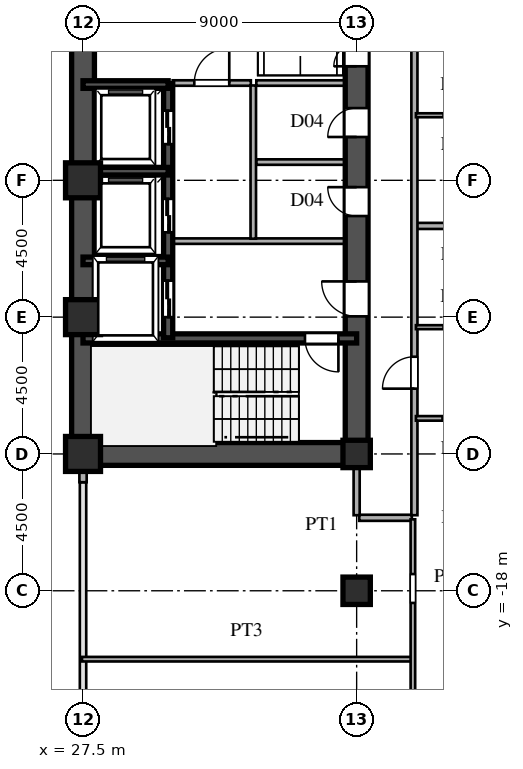
"""IFC4 building model, lengths in metres.
Left out: names, types, materials, properties, quantities, classifications, styles, units other than length and angle.
Written with IfcOpenShell. Run it as: python <this file> out.ifc"""

import sys

from ifc_helpers import new_model, si_unit, direction, frame, frame_2d, origin, origin_2d, place, context, subcontext, project, spatial, rectangle, hollow_rectangle, i_section, extrude, source, transform, mapped, element, fill, save


model = new_model("IFC4")
c1 = context("Model", 3, precision=1e-05, world=origin(), true_north=direction((0.0, 1.0)))
c2 = subcontext(c1, "Body", "Model", "MODEL_VIEW")
j1 = project(units=[si_unit("LENGTHUNIT", "METRE"), si_unit("PLANEANGLEUNIT", "RADIAN")], contexts=[c1])
p1 = place(None, origin())
s1 = spatial("IfcSite", under=j1, at=p1, CompositionType="ELEMENT")
p2 = place(p1, origin())
s2 = spatial("IfcBuilding", under=s1, at=p2, CompositionType="ELEMENT")
p3 = place(p2, frame((0.0, 0.0, 29.7)))
s3 = spatial("IfcBuildingStorey", under=s2, at=p3, CompositionType="ELEMENT", Elevation=29.7)
m1 = source(origin(), c2, "Body", "SweptSolid", [
    extrude(hollow_rectangle(XDim=1.15, YDim=1.15, WallThickness=0.048, at=origin_2d()), origin(), (0.0, 0.0, 1.0), 3.6),
])
for number, where, z_axis, x_axis in (
    (1, (27.5, -13.5, 0.0), (0.0, 0.0, 1.0), (1.0, 0.0, 0.0)),
    (2, (27.5, -9.0, 0.0), (0.0, 0.0, 1.0), (1.0, 0.0, 0.0)),
    (3, (27.5, -4.5, 0.0), (0.0, 0.0, 1.0), (1.0, 0.0, 0.0)),
):
    element("IfcColumn", number, at=place(p3, frame(where, z_axis=z_axis, x_axis=x_axis)), inside=s3, PredefinedType="COLUMN", context=c2, shape_type="MappedRepresentation", body=[
        mapped(m1, transform((0.0, 0.0, 0.0), scale=1.0)),
    ])
m2 = source(origin(), c2, "Body", "SweptSolid", [
    extrude(i_section(OverallWidth=0.9, OverallDepth=0.9, WebThickness=0.036, FlangeThickness=0.055, at=origin_2d()), origin(), (0.0, 0.0, 1.0), 3.6),
])
for number, where, z_axis, x_axis in (
    (4, (36.5, -18.0, 0.0), (0.0, 0.0, 1.0), (1.0, 0.0, 0.0)),
    (5, (36.5, -13.5, 0.0), (0.0, 0.0, 1.0), (1.0, 0.0, 0.0)),
):
    element("IfcColumn", number, at=place(p3, frame(where, z_axis=z_axis, x_axis=x_axis)), inside=s3, PredefinedType="COLUMN", context=c2, shape_type="MappedRepresentation", body=[
        mapped(m2, transform((0.0, 0.0, 0.0), scale=1.0)),
    ])
p4 = place(p3, frame((27.5, -14.43, 0.0), z_axis=(0.0, 0.0, 1.0), x_axis=(0.0, 1.0, 0.0)))
e6 = element("IfcWall", 6, at=p4, inside=s3, PredefinedType="SOLIDWALL", context=c2, shape_type="SweptSolid", body=[
    extrude(rectangle(XDim=0.55, YDim=0.24, at=frame_2d((0.275, 0.0))), origin(), (0.0, 0.0, 1.0), 2.88),
])
p5 = place(p3, frame((27.5, -13.5, 0.0), z_axis=(0.0, 0.0, 1.0), x_axis=(0.0, 1.0, 0.0)))
e7 = element("IfcWall", 7, at=p5, inside=s3, PredefinedType="SHEAR", context=c2, shape_type="SweptSolid", body=[
    extrude(rectangle(XDim=12.2, YDim=0.75, at=frame_2d((6.1, 0.0))), origin(), (0.0, 0.0, 1.0), 3.38),
])
p6 = place(p3, frame((27.5, -1.3, 0.0), z_axis=(0.0, 0.0, 1.0), x_axis=(0.0, 1.0, 0.0)))
e8 = element("IfcWall", 8, at=p6, inside=s3, PredefinedType="SHEAR", context=c2, shape_type="SweptSolid", body=[
    extrude(rectangle(XDim=2.6, YDim=0.75, at=frame_2d((1.3, 0.0))), origin(), (0.0, 0.0, 1.0), 3.38),
])
p7 = place(p3, frame((27.5, -13.5, 0.0), z_axis=(0.0, 0.0, 1.0), x_axis=(1.0, 0.0, 0.0)))
e9 = element("IfcWall", 9, at=p7, inside=s3, PredefinedType="SHEAR", context=c2, shape_type="SweptSolid", body=[
    extrude(rectangle(XDim=9.0, YDim=0.75, at=frame_2d((4.5, 0.0))), origin(), (0.0, 0.0, 1.0), 3.38),
])
p8 = place(p3, frame((36.5, -13.65, 0.0), z_axis=(0.0, 0.0, 1.0), x_axis=(0.0, 1.0, 0.0)))
e10 = element("IfcWall", 10, at=p8, inside=s3, PredefinedType="SHEAR", context=c2, shape_type="SweptSolid", body=[
    extrude(rectangle(XDim=7.15, YDim=0.75, at=frame_2d((3.575, 0.0))), origin(), (0.0, 0.0, 1.0), 3.38),
])
p9 = place(p8, frame((4.675, 0.0, 0.0)))
e11 = element("IfcOpeningElement", 11, at=p9, cuts=e10, PredefinedType="OPENING", context=c2, shape_type="SweptSolid", body=[
    extrude(rectangle(XDim=1.15, YDim=2.2, at=frame_2d((0.575, 1.1))), frame((0.0, 0.385, 0.0), z_axis=(0.0, -1.0, 0.0), x_axis=(1.0, 0.0, 0.0)), (0.0, 0.0, 1.0), 0.77),
])
p10 = place(p3, frame((36.5, -1.3, 0.0), z_axis=(0.0, 0.0, 1.0), x_axis=(0.0, 1.0, 0.0)))
e12 = element("IfcWall", 12, at=p10, inside=s3, PredefinedType="SHEAR", context=c2, shape_type="SweptSolid", body=[
    extrude(rectangle(XDim=2.6, YDim=0.75, at=frame_2d((1.3, 0.0))), origin(), (0.0, 0.0, 1.0), 3.38),
])
p11 = place(p10, frame((0.55, 0.0, 0.0)))
e13 = element("IfcOpeningElement", 13, at=p11, cuts=e12, PredefinedType="OPENING", context=c2, shape_type="SweptSolid", body=[
    extrude(rectangle(XDim=1.5, YDim=2.3, at=frame_2d((0.75, 1.15))), frame((0.0, 0.385, 0.0), z_axis=(0.0, -1.0, 0.0), x_axis=(1.0, 0.0, 0.0)), (0.0, 0.0, 1.0), 0.77),
])
p12 = place(p3, frame((36.5, -6.5, 0.0), z_axis=(0.0, 0.0, 1.0), x_axis=(0.0, 1.0, 0.0)))
e14 = element("IfcWall", 14, at=p12, inside=s3, PredefinedType="SHEAR", context=c2, shape_type="SweptSolid", body=[
    extrude(rectangle(XDim=2.6, YDim=0.75, at=frame_2d((1.3, 0.0))), origin(), (0.0, 0.0, 1.0), 3.38),
])
p13 = place(p12, frame((0.825, 0.0, 0.0)))
e15 = element("IfcOpeningElement", 15, at=p13, cuts=e14, PredefinedType="OPENING", context=c2, shape_type="SweptSolid", body=[
    extrude(rectangle(XDim=0.95, YDim=2.15, at=frame_2d((0.475, 1.075))), frame((0.0, 0.385, 0.0), z_axis=(0.0, -1.0, 0.0), x_axis=(1.0, 0.0, 0.0)), (0.0, 0.0, 1.0), 0.77),
])
p14 = place(p3, frame((36.5, -3.9, 0.0), z_axis=(0.0, 0.0, 1.0), x_axis=(0.0, 1.0, 0.0)))
e16 = element("IfcWall", 16, at=p14, inside=s3, PredefinedType="SHEAR", context=c2, shape_type="SweptSolid", body=[
    extrude(rectangle(XDim=2.6, YDim=0.75, at=frame_2d((1.3, 0.0))), origin(), (0.0, 0.0, 1.0), 3.38),
])
p15 = place(p14, frame((0.825, 0.0, 0.0)))
e17 = element("IfcOpeningElement", 17, at=p15, cuts=e16, PredefinedType="OPENING", context=c2, shape_type="SweptSolid", body=[
    extrude(rectangle(XDim=0.95, YDim=2.15, at=frame_2d((0.475, 1.075))), frame((0.0, 0.385, 0.0), z_axis=(0.0, -1.0, 0.0), x_axis=(1.0, 0.0, 0.0)), (0.0, 0.0, 1.0), 0.77),
])
p16 = place(p3, frame((27.5, -9.7, 0.0), z_axis=(0.0, 0.0, 1.0), x_axis=(1.0, 0.0, 0.0)))
e18 = element("IfcWall", 18, at=p16, inside=s3, PredefinedType="SHEAR", context=c2, shape_type="SweptSolid", body=[
    extrude(rectangle(XDim=9.0, YDim=0.3, at=frame_2d((4.5, 0.0))), origin(), (0.0, 0.0, 1.0), 3.38),
])
p17 = place(p16, frame((7.3, 0.0, 0.0)))
e19 = element("IfcOpeningElement", 19, at=p17, cuts=e18, PredefinedType="OPENING", context=c2, shape_type="SweptSolid", body=[
    extrude(rectangle(XDim=1.1, YDim=2.2, at=frame_2d((0.55, 1.1))), frame((0.0, 0.16, 0.0), z_axis=(0.0, -1.0, 0.0), x_axis=(1.0, 0.0, 0.0)), (0.0, 0.0, 1.0), 0.32),
])
for number, where, z_axis, x_axis in (
    (20, (27.5, -7.15, 0.0), (0.0, 0.0, 1.0), (1.0, 0.0, 0.0)),
    (21, (27.5, -4.2, 0.0), (0.0, 0.0, 1.0), (1.0, 0.0, 0.0)),
    (22, (27.5, -1.35, 0.0), (0.0, 0.0, 1.0), (1.0, 0.0, 0.0)),
):
    element("IfcWall", number, at=place(p3, frame(where, z_axis=z_axis, x_axis=x_axis)), inside=s3, PredefinedType="SHEAR", context=c2, shape_type="SweptSolid", body=[
        extrude(rectangle(XDim=2.8, YDim=0.25, at=frame_2d((1.4, 0.0))), origin(), (0.0, 0.0, 1.0), 3.38),
    ])
p18 = place(p3, frame((30.3, -9.68, 0.0), z_axis=(0.0, 0.0, 1.0), x_axis=(0.0, 1.0, 0.0)))
e23 = element("IfcWall", 23, at=p18, inside=s3, PredefinedType="SHEAR", context=c2, shape_type="SweptSolid", body=[
    extrude(rectangle(XDim=2.56, YDim=0.3, at=frame_2d((1.28, 0.0))), origin(), (0.0, 0.0, 1.0), 3.38),
])
p19 = place(p18, frame((0.68, 0.0, 0.0)))
e24 = element("IfcOpeningElement", 24, at=p19, cuts=e23, PredefinedType="OPENING", context=c2, shape_type="SweptSolid", body=[
    extrude(rectangle(XDim=1.2, YDim=2.25, at=frame_2d((0.6, 1.125))), frame((0.0, 0.16, 0.0), z_axis=(0.0, -1.0, 0.0), x_axis=(1.0, 0.0, 0.0)), (0.0, 0.0, 1.0), 0.32),
])
p20 = place(p3, frame((30.3, -7.12, 0.0), z_axis=(0.0, 0.0, 1.0), x_axis=(0.0, 1.0, 0.0)))
e25 = element("IfcWall", 25, at=p20, inside=s3, PredefinedType="SHEAR", context=c2, shape_type="SweptSolid", body=[
    extrude(rectangle(XDim=2.92, YDim=0.3, at=frame_2d((1.46, 0.0))), origin(), (0.0, 0.0, 1.0), 3.38),
])
p21 = place(p20, frame((0.91, 0.0, 0.0)))
e26 = element("IfcOpeningElement", 26, at=p21, cuts=e25, PredefinedType="OPENING", context=c2, shape_type="SweptSolid", body=[
    extrude(rectangle(XDim=1.1, YDim=2.2, at=frame_2d((0.55, 1.1))), frame((0.0, 0.16, 0.0), z_axis=(0.0, -1.0, 0.0), x_axis=(1.0, 0.0, 0.0)), (0.0, 0.0, 1.0), 0.32),
])
p22 = place(p3, frame((30.3, -4.2, 0.0), z_axis=(0.0, 0.0, 1.0), x_axis=(0.0, 1.0, 0.0)))
e27 = element("IfcWall", 27, at=p22, inside=s3, PredefinedType="SHEAR", context=c2, shape_type="SweptSolid", body=[
    extrude(rectangle(XDim=2.88, YDim=0.3, at=frame_2d((1.44, 0.0))), origin(), (0.0, 0.0, 1.0), 3.38),
])
p23 = place(p22, frame((0.89, 0.0, 0.0)))
e28 = element("IfcOpeningElement", 28, at=p23, cuts=e27, PredefinedType="OPENING", context=c2, shape_type="SweptSolid", body=[
    extrude(rectangle(XDim=1.1, YDim=2.2, at=frame_2d((0.55, 1.1))), frame((0.0, 0.16, 0.0), z_axis=(0.0, -1.0, 0.0), x_axis=(1.0, 0.0, 0.0)), (0.0, 0.0, 1.0), 0.32),
])
p24 = place(p3, frame((30.45, -6.5, 0.0), z_axis=(0.0, 0.0, 1.0), x_axis=(1.0, 0.0, 0.0)))
e29 = element("IfcWall", 29, at=p24, inside=s3, PredefinedType="PARTITIONING", context=c2, shape_type="SweptSolid", body=[
    extrude(rectangle(XDim=5.7, YDim=0.18, at=frame_2d((2.85, 0.0))), origin(), (0.0, 0.0, 1.0), 3.38),
])
p25 = place(p3, frame((33.1, -6.42, 0.0), z_axis=(0.0, 0.0, 1.0), x_axis=(0.0, 1.0, 0.0)))
e30 = element("IfcWall", 30, at=p25, inside=s3, PredefinedType="PARTITIONING", context=c2, shape_type="SweptSolid", body=[
    extrude(rectangle(XDim=5.04, YDim=0.18, at=frame_2d((2.52, 0.0))), origin(), (0.0, 0.0, 1.0), 3.38),
])
p26 = place(p3, frame((30.45, -1.3, 0.0), z_axis=(0.0, 0.0, 1.0), x_axis=(1.0, 0.0, 0.0)))
e31 = element("IfcWall", 31, at=p26, inside=s3, PredefinedType="PARTITIONING", context=c2, shape_type="SweptSolid", body=[
    extrude(rectangle(XDim=2.57, YDim=0.18, at=frame_2d((1.285, 0.0))), origin(), (0.0, 0.0, 1.0), 3.38),
])
p27 = place(p26, frame((0.71, 0.0, 0.0)))
e32 = element("IfcOpeningElement", 32, at=p27, cuts=e31, PredefinedType="OPENING", context=c2, shape_type="SweptSolid", body=[
    extrude(rectangle(XDim=1.15, YDim=2.2, at=frame_2d((0.575, 1.1))), frame((0.0, 0.1, 0.0), z_axis=(0.0, -1.0, 0.0), x_axis=(1.0, 0.0, 0.0)), (0.0, 0.0, 1.0), 0.2),
])
for number, where, z_axis, x_axis in (
    (33, (33.2, -1.3, 0.0), (0.0, 0.0, 1.0), (1.0, 0.0, 0.0)),
    (34, (33.2, -3.9, 0.0), (0.0, 0.0, 1.0), (1.0, 0.0, 0.0)),
):
    element("IfcWall", number, at=place(p3, frame(where, z_axis=z_axis, x_axis=x_axis)), inside=s3, PredefinedType="PARTITIONING", context=c2, shape_type="SweptSolid", body=[
        extrude(rectangle(XDim=2.95, YDim=0.18, at=frame_2d((1.475, 0.0))), origin(), (0.0, 0.0, 1.0), 3.38),
    ])
p28 = place(p3, frame((27.465, -20.25, 0.0), z_axis=(0.0, 0.0, 1.0), x_axis=(1.0, 0.0, 0.0)))
e35 = element("IfcWall", 35, at=p28, inside=s3, PredefinedType="PARTITIONING", context=c2, shape_type="SweptSolid", body=[
    extrude(rectangle(XDim=10.835, YDim=0.15, at=frame_2d((5.417, 0.0))), origin(), (0.0, 0.0, 1.0), 3.38),
])
p29 = place(p3, frame((36.585, -15.6, 0.0), z_axis=(0.0, 0.0, 1.0), x_axis=(1.0, 0.0, 0.0)))
e36 = element("IfcWall", 36, at=p29, inside=s3, PredefinedType="PARTITIONING", context=c2, shape_type="SweptSolid", body=[
    extrude(rectangle(XDim=1.73, YDim=0.2, at=frame_2d((0.865, 0.0))), origin(), (0.0, 0.0, 1.0), 3.38),
])
p30 = place(p3, frame((38.45, -12.33, 0.0), z_axis=(0.0, 0.0, 1.0), x_axis=(1.0, 0.0, 0.0)))
e37 = element("IfcWall", 37, at=p30, inside=s3, PredefinedType="PARTITIONING", context=c2, shape_type="SweptSolid", body=[
    extrude(rectangle(XDim=2.7, YDim=0.15, at=frame_2d((1.35, 0.0))), origin(), (0.0, 0.0, 1.0), 3.38),
])
p31 = place(p30, frame((0.875, 0.0, 0.0)))
e38 = element("IfcOpeningElement", 38, at=p31, cuts=e37, PredefinedType="OPENING", context=c2, shape_type="SweptSolid", body=[
    extrude(rectangle(XDim=0.95, YDim=2.15, at=frame_2d((0.475, 1.075))), frame((0.0, 0.085, 0.0), z_axis=(0.0, -1.0, 0.0), x_axis=(1.0, 0.0, 0.0)), (0.0, 0.0, 1.0), 0.17),
])
p32 = place(p3, frame((38.45, -9.33, 0.0), z_axis=(0.0, 0.0, 1.0), x_axis=(1.0, 0.0, 0.0)))
e39 = element("IfcWall", 39, at=p32, inside=s3, PredefinedType="PARTITIONING", context=c2, shape_type="SweptSolid", body=[
    extrude(rectangle(XDim=2.7, YDim=0.13, at=frame_2d((1.35, 0.0))), origin(), (0.0, 0.0, 1.0), 3.38),
])
p33 = place(p32, frame((0.91, 0.0, 0.0)))
e40 = element("IfcOpeningElement", 40, at=p33, cuts=e39, PredefinedType="OPENING", context=c2, shape_type="SweptSolid", body=[
    extrude(rectangle(XDim=0.88, YDim=2.1, at=frame_2d((0.44, 1.05))), frame((0.0, 0.075, 0.0), z_axis=(0.0, -1.0, 0.0), x_axis=(1.0, 0.0, 0.0)), (0.0, 0.0, 1.0), 0.15),
])
p34 = place(p3, frame((38.48, -6.0, 0.0), z_axis=(0.0, 0.0, 1.0), x_axis=(1.0, 0.0, 0.0)))
e41 = element("IfcWall", 41, at=p34, inside=s3, PredefinedType="PARTITIONING", context=c2, shape_type="SweptSolid", body=[
    extrude(rectangle(XDim=34.025, YDim=0.2, at=frame_2d((17.012, 0.0))), origin(), (0.0, 0.0, 1.0), 3.38),
])
p35 = place(p3, frame((38.45, -2.36, 0.0), z_axis=(0.0, 0.0, 1.0), x_axis=(1.0, 0.0, 0.0)))
e42 = element("IfcWall", 42, at=p35, inside=s3, PredefinedType="PARTITIONING", context=c2, shape_type="SweptSolid", body=[
    extrude(rectangle(XDim=2.7, YDim=0.13, at=frame_2d((1.35, 0.0))), origin(), (0.0, 0.0, 1.0), 3.38),
])
p36 = place(p35, frame((0.91, 0.0, 0.0)))
e43 = element("IfcOpeningElement", 43, at=p36, cuts=e42, PredefinedType="OPENING", context=c2, shape_type="SweptSolid", body=[
    extrude(rectangle(XDim=0.88, YDim=2.1, at=frame_2d((0.44, 1.05))), frame((0.0, 0.075, 0.0), z_axis=(0.0, -1.0, 0.0), x_axis=(1.0, 0.0, 0.0)), (0.0, 0.0, 1.0), 0.15),
])
p37 = place(p3, frame((36.5, -15.515, 0.0), z_axis=(0.0, 0.0, 1.0), x_axis=(0.0, 1.0, 0.0)))
e44 = element("IfcWall", 44, at=p37, inside=s3, PredefinedType="PARTITIONING", context=c2, shape_type="SweptSolid", body=[
    extrude(rectangle(XDim=1.635, YDim=0.2, at=frame_2d((0.817, 0.0))), origin(), (0.0, 0.0, 1.0), 2.68),
])
p38 = place(p3, frame((38.35, -23.858, 0.0), z_axis=(0.0, 0.0, 1.0), x_axis=(0.0, 1.0, 0.0)))
e45 = element("IfcWall", 45, at=p38, inside=s3, PredefinedType="PARTITIONING", context=c2, shape_type="SweptSolid", body=[
    extrude(rectangle(XDim=8.208, YDim=0.15, at=frame_2d((4.104, 0.0))), origin(), (0.0, 0.0, 1.0), 3.38),
])
p39 = place(p38, frame((1.347, 0.0, 0.0)))
e46 = element("IfcOpeningElement", 46, at=p39, cuts=e45, PredefinedType="OPENING", context=c2, shape_type="SweptSolid", body=[
    extrude(rectangle(XDim=0.95, YDim=2.15, at=frame_2d((0.475, 1.075))), frame((0.0, 0.085, 0.0), z_axis=(0.0, -1.0, 0.0), x_axis=(1.0, 0.0, 0.0)), (0.0, 0.0, 1.0), 0.17),
])
p40 = place(p38, frame((5.458, 0.0, 0.0)))
e47 = element("IfcOpeningElement", 47, at=p40, cuts=e45, PredefinedType="OPENING", context=c2, shape_type="SweptSolid", body=[
    extrude(rectangle(XDim=0.95, YDim=2.15, at=frame_2d((0.475, 1.075))), frame((0.0, 0.085, 0.0), z_axis=(0.0, -1.0, 0.0), x_axis=(1.0, 0.0, 0.0)), (0.0, 0.0, 1.0), 0.17),
])
p41 = place(p3, frame((38.4, -15.515, 0.0), z_axis=(0.0, 0.0, 1.0), x_axis=(0.0, 1.0, 0.0)))
e48 = element("IfcWall", 48, at=p41, inside=s3, PredefinedType="PARTITIONING", context=c2, shape_type="SweptSolid", body=[
    extrude(rectangle(XDim=31.03, YDim=0.2, at=frame_2d((15.515, 0.0))), origin(), (0.0, 0.0, 1.0), 3.38),
])
p42 = place(p41, frame((4.163, 0.0, 0.0)))
e49 = element("IfcOpeningElement", 49, at=p42, cuts=e48, PredefinedType="OPENING", context=c2, shape_type="SweptSolid", body=[
    extrude(rectangle(XDim=1.05, YDim=2.25, at=frame_2d((0.525, 1.125))), frame((0.0, 0.11, 0.0), z_axis=(0.0, -1.0, 0.0), x_axis=(1.0, 0.0, 0.0)), (0.0, 0.0, 1.0), 0.22),
])
p43 = place(p41, frame((15.538, 0.0, 0.0)))
e50 = element("IfcOpeningElement", 50, at=p43, cuts=e48, PredefinedType="OPENING", context=c2, shape_type="SweptSolid", body=[
    extrude(rectangle(XDim=1.05, YDim=2.25, at=frame_2d((0.525, 1.125))), frame((0.0, 0.11, 0.0), z_axis=(0.0, -1.0, 0.0), x_axis=(1.0, 0.0, 0.0)), (0.0, 0.0, 1.0), 0.22),
])
p44 = place(p41, frame((26.635, 0.0, 0.0)))
e51 = element("IfcOpeningElement", 51, at=p44, cuts=e48, PredefinedType="OPENING", context=c2, shape_type="SweptSolid", body=[
    extrude(rectangle(XDim=1.05, YDim=2.25, at=frame_2d((0.525, 1.125))), frame((0.0, 0.11, 0.0), z_axis=(0.0, -1.0, 0.0), x_axis=(1.0, 0.0, 0.0)), (0.0, 0.0, 1.0), 0.22),
])
m3 = source(origin(), c2, "Body", "SweptSolid", [
    extrude(rectangle(XDim=1.15, YDim=2.2, at=frame_2d((0.575, 1.1))), frame((0.0, 0.025, 0.0), z_axis=(0.0, -1.0, 0.0), x_axis=(1.0, 0.0, 0.0)), (0.0, 0.0, 1.0), 0.05),
])
p45 = place(p9, origin())
e52 = element("IfcDoor", 52, at=p45, inside=s3, OperationType="SINGLE_SWING_RIGHT", PredefinedType="DOOR", context=c2, shape_type="MappedRepresentation", body=[
    mapped(m3, transform((0.0, 0.0, 0.0), scale=1.0)),
])
fill(e11, e52)
m4 = source(origin(), c2, "Body", "SweptSolid", [
    extrude(rectangle(XDim=1.5, YDim=2.3, at=frame_2d((0.75, 1.15))), frame((0.0, 0.025, 0.0), z_axis=(0.0, -1.0, 0.0), x_axis=(1.0, 0.0, 0.0)), (0.0, 0.0, 1.0), 0.05),
])
p46 = place(p11, origin())
e53 = element("IfcDoor", 53, at=p46, inside=s3, OperationType="DOUBLE_SWING_LEFT", PredefinedType="DOOR", context=c2, shape_type="MappedRepresentation", body=[
    mapped(m4, transform((0.0, 0.0, 0.0), scale=1.0)),
])
fill(e13, e53)
m5 = source(origin(), c2, "Body", "SweptSolid", [
    extrude(rectangle(XDim=0.95, YDim=2.15, at=frame_2d((0.475, 1.075))), frame((0.0, 0.025, 0.0), z_axis=(0.0, -1.0, 0.0), x_axis=(1.0, 0.0, 0.0)), (0.0, 0.0, 1.0), 0.05),
])
p47 = place(p13, origin())
e54 = element("IfcDoor", 54, at=p47, inside=s3, OperationType="SINGLE_SWING_RIGHT", PredefinedType="DOOR", context=c2, shape_type="MappedRepresentation", body=[
    mapped(m5, transform((0.0, 0.0, 0.0), scale=1.0)),
])
fill(e15, e54)
p48 = place(p15, origin())
e55 = element("IfcDoor", 55, at=p48, inside=s3, OperationType="SINGLE_SWING_LEFT", PredefinedType="DOOR", context=c2, shape_type="MappedRepresentation", body=[
    mapped(m5, transform((0.0, 0.0, 0.0), scale=1.0)),
])
fill(e17, e55)
m6 = source(origin(), c2, "Body", "SweptSolid", [
    extrude(rectangle(XDim=1.1, YDim=2.2, at=frame_2d((0.55, 1.1))), frame((0.0, 0.025, 0.0), z_axis=(0.0, -1.0, 0.0), x_axis=(1.0, 0.0, 0.0)), (0.0, 0.0, 1.0), 0.05),
])
p49 = place(p17, frame((1.1, 0.0, 0.0), z_axis=(0.0, 0.0, 1.0), x_axis=(-1.0, 0.0, 0.0)))
e56 = element("IfcDoor", 56, at=p49, inside=s3, OperationType="SINGLE_SWING_RIGHT", PredefinedType="DOOR", context=c2, shape_type="MappedRepresentation", body=[
    mapped(m6, transform((0.0, 0.0, 0.0), scale=1.0)),
])
fill(e19, e56)
m7 = source(origin(), c2, "Body", "SweptSolid", [
    extrude(rectangle(XDim=1.2, YDim=2.25, at=frame_2d((0.6, 1.125))), frame((0.0, 0.025, 0.0), z_axis=(0.0, -1.0, 0.0), x_axis=(1.0, 0.0, 0.0)), (0.0, 0.0, 1.0), 0.05),
])
p50 = place(p19, origin())
e57 = element("IfcDoor", 57, at=p50, inside=s3, OperationType="DOUBLE_DOOR_SLIDING", PredefinedType="DOOR", context=c2, shape_type="MappedRepresentation", body=[
    mapped(m7, transform((0.0, 0.0, 0.0), scale=1.0)),
])
fill(e24, e57)
m8 = source(origin(), c2, "Body", "SweptSolid", [
    extrude(rectangle(XDim=1.1, YDim=2.2, at=frame_2d((0.55, 1.1))), frame((0.0, 0.025, 0.0), z_axis=(0.0, -1.0, 0.0), x_axis=(1.0, 0.0, 0.0)), (0.0, 0.0, 1.0), 0.05),
])
p51 = place(p21, origin())
e58 = element("IfcDoor", 58, at=p51, inside=s3, OperationType="DOUBLE_DOOR_SLIDING", PredefinedType="DOOR", context=c2, shape_type="MappedRepresentation", body=[
    mapped(m8, transform((0.0, 0.0, 0.0), scale=1.0)),
])
fill(e26, e58)
p52 = place(p23, origin())
e59 = element("IfcDoor", 59, at=p52, inside=s3, OperationType="DOUBLE_DOOR_SLIDING", PredefinedType="DOOR", context=c2, shape_type="MappedRepresentation", body=[
    mapped(m8, transform((0.0, 0.0, 0.0), scale=1.0)),
])
fill(e28, e59)
p53 = place(p27, origin())
e60 = element("IfcDoor", 60, at=p53, inside=s3, OperationType="SINGLE_SWING_RIGHT", PredefinedType="DOOR", context=c2, shape_type="MappedRepresentation", body=[
    mapped(m3, transform((0.0, 0.0, 0.0), scale=1.0)),
])
fill(e32, e60)
m9 = source(origin(), c2, "Body", "SweptSolid", [
    extrude(rectangle(XDim=1.05, YDim=2.25, at=frame_2d((0.525, 1.125))), frame((0.0, 0.025, 0.0), z_axis=(0.0, -1.0, 0.0), x_axis=(1.0, 0.0, 0.0)), (0.0, 0.0, 1.0), 0.05),
])
p54 = place(p42, origin())
e61 = element("IfcDoor", 61, at=p54, inside=s3, OperationType="SINGLE_SWING_LEFT", PredefinedType="DOOR", context=c2, shape_type="MappedRepresentation", body=[
    mapped(m9, transform((0.0, 0.0, 0.0), scale=1.0)),
])
fill(e49, e61)
save(model, sys.argv[1])
